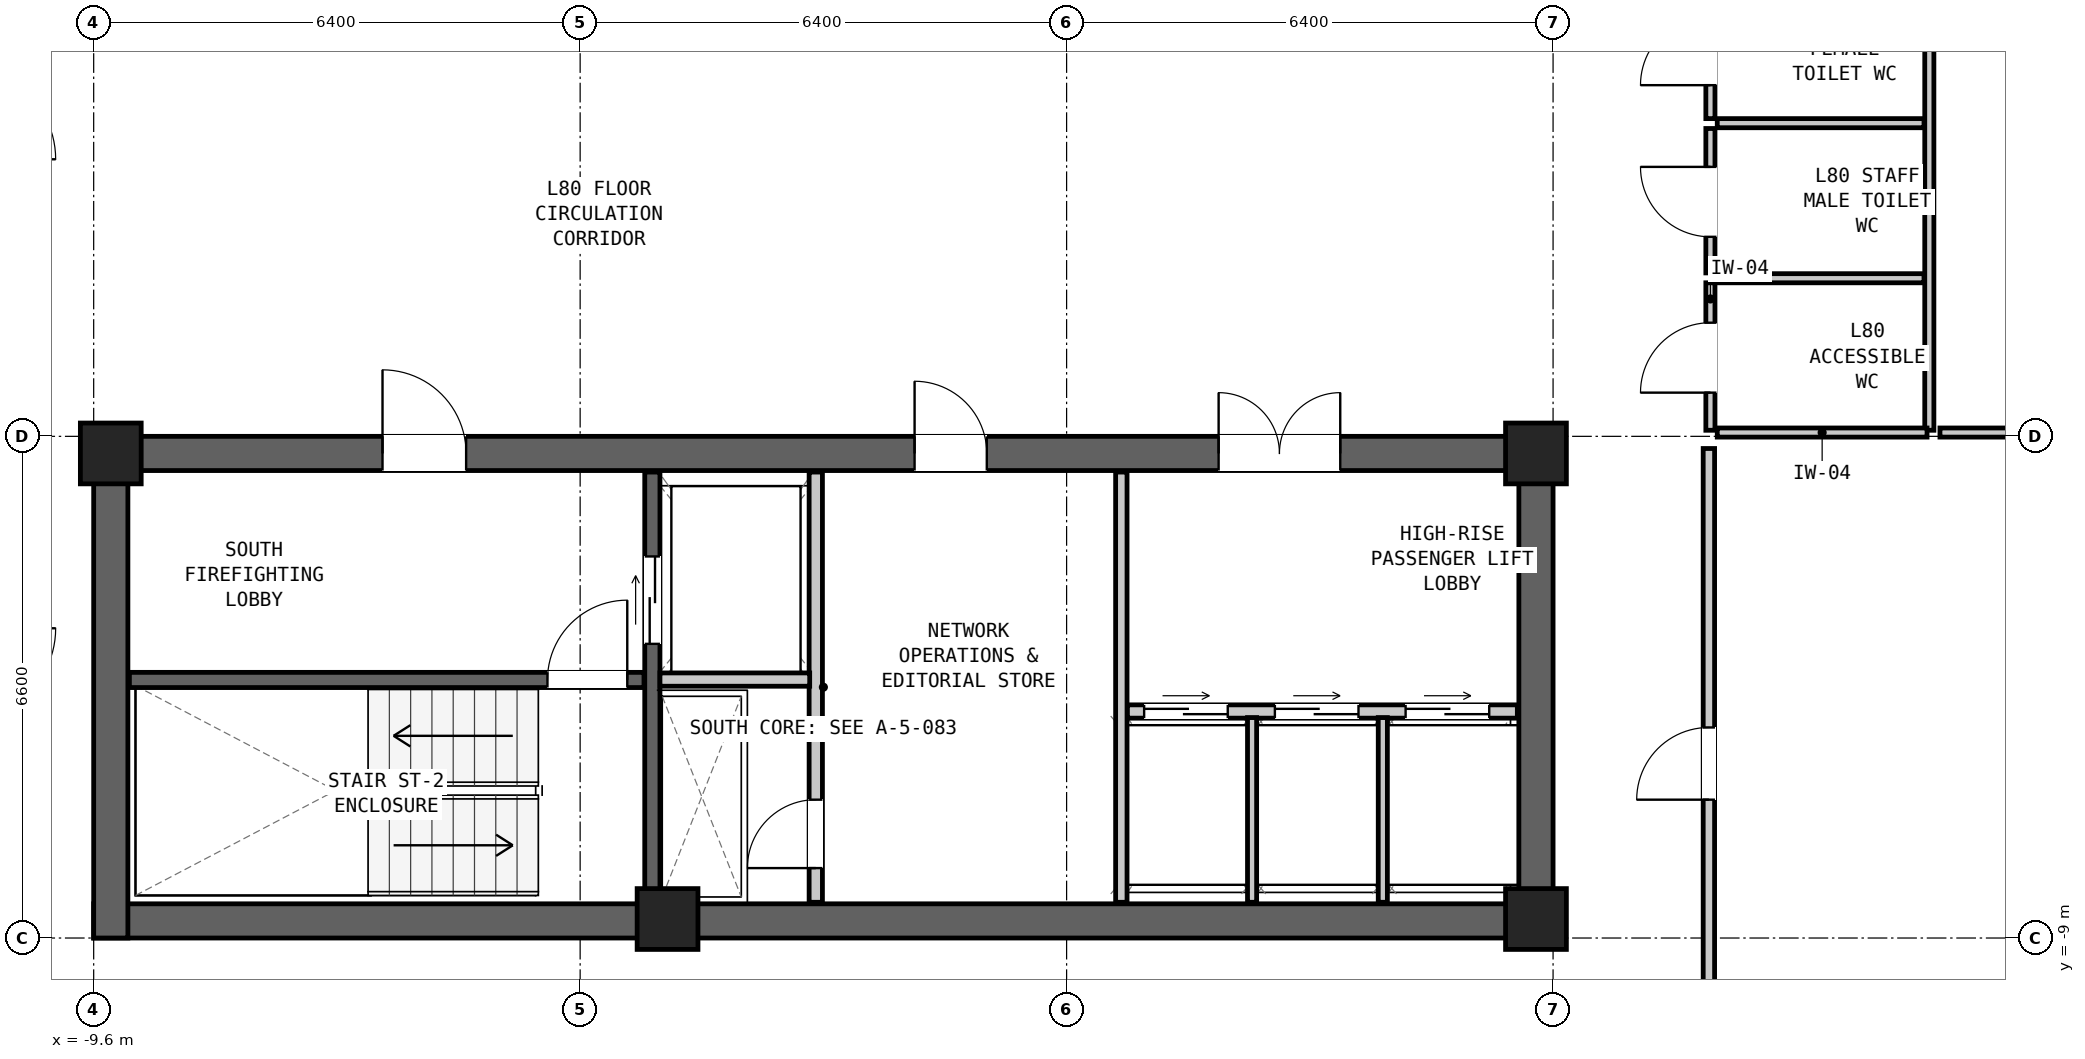
"""IFC4 building model, lengths in metres.
Left out: names, types, materials, properties, quantities, classifications, styles, units other than length and angle.
Written with IfcOpenShell. Run it as: python <this file> out.ifc"""

import sys

from ifc_helpers import new_model, si_unit, direction, frame, frame_2d, origin, origin_2d, place, context, subcontext, project, spatial, rectangle, extrude, element, fill, save


model = new_model("IFC4")
c1 = context("Model", 3, precision=1e-05, world=origin(), true_north=direction((0.0, 1.0)))
c2 = subcontext(c1, "Body", "Model", "MODEL_VIEW")
j1 = project(units=[si_unit("LENGTHUNIT", "METRE"), si_unit("PLANEANGLEUNIT", "RADIAN")], contexts=[c1])
p1 = place(None, origin())
s1 = spatial("IfcSite", under=j1, at=p1, CompositionType="ELEMENT")
p2 = place(p1, origin())
s2 = spatial("IfcBuilding", under=s1, at=p2, CompositionType="ELEMENT")
p3 = place(p2, frame((0.0, 0.0, 270.3)))
s3 = spatial("IfcBuildingStorey", under=s2, at=p3, CompositionType="ELEMENT", Elevation=270.3)
p4 = place(p3, frame((-9.6, -8.775, 0.0), z_axis=(0.0, 0.0, 1.0), x_axis=(1.0, 0.0, 0.0)))
e1 = element("IfcWall", 1, at=p4, inside=s3, PredefinedType="SHEAR", context=c2, shape_type="SweptSolid", body=[
    extrude(rectangle(XDim=19.2, YDim=0.45, at=frame_2d((9.6, 0.0))), origin(), (0.0, 0.0, 1.0), 3.05),
])
p5 = place(p3, frame((-9.6, -2.625, 0.0), z_axis=(0.0, 0.0, 1.0), x_axis=(1.0, 0.0, 0.0)))
e2 = element("IfcWall", 2, at=p5, inside=s3, PredefinedType="SHEAR", context=c2, shape_type="SweptSolid", body=[
    extrude(rectangle(XDim=19.2, YDim=0.45, at=frame_2d((9.6, 0.0))), origin(), (0.0, 0.0, 1.0), 3.05),
])
p6 = place(p5, frame((3.8, 0.0, 0.0)))
e3 = element("IfcOpeningElement", 3, at=p6, cuts=e2, PredefinedType="OPENING", context=c2, shape_type="SweptSolid", body=[
    extrude(rectangle(XDim=1.1, YDim=2.08, at=frame_2d((0.55, 1.04))), frame((0.0, 0.237, 0.0), z_axis=(0.0, -1.0, 0.0), x_axis=(1.0, 0.0, 0.0)), (0.0, 0.0, 1.0), 0.474),
])
p7 = place(p5, frame((10.8, 0.0, 0.0)))
e4 = element("IfcOpeningElement", 4, at=p7, cuts=e2, PredefinedType="OPENING", context=c2, shape_type="SweptSolid", body=[
    extrude(rectangle(XDim=0.95, YDim=2.1, at=frame_2d((0.475, 1.05))), frame((0.0, 0.237, 0.0), z_axis=(0.0, -1.0, 0.0), x_axis=(1.0, 0.0, 0.0)), (0.0, 0.0, 1.0), 0.474),
])
p8 = place(p5, frame((14.8, 0.0, 0.0)))
e5 = element("IfcOpeningElement", 5, at=p8, cuts=e2, PredefinedType="OPENING", context=c2, shape_type="SweptSolid", body=[
    extrude(rectangle(XDim=1.6, YDim=2.12, at=frame_2d((0.8, 1.06))), frame((0.0, 0.237, 0.0), z_axis=(0.0, -1.0, 0.0), x_axis=(1.0, 0.0, 0.0)), (0.0, 0.0, 1.0), 0.474),
])
for number, where, z_axis, x_axis in (
    (6, (-9.375, -9.0, 0.0), (0.0, 0.0, 1.0), (0.0, 1.0, 0.0)),
    (7, (9.375, -9.0, 0.0), (0.0, 0.0, 1.0), (0.0, 1.0, 0.0)),
):
    element("IfcWall", number, at=place(p3, frame(where, z_axis=z_axis, x_axis=x_axis)), inside=s3, PredefinedType="SHEAR", context=c2, shape_type="SweptSolid", body=[
        extrude(rectangle(XDim=6.6, YDim=0.45, at=frame_2d((3.3, 0.0))), origin(), (0.0, 0.0, 1.0), 3.05),
    ])
for number, where, z_axis, x_axis in (
    (8, (-9.375, -2.625, 0.0), (0.0, 0.0, 1.0), (1.0, 0.0, 0.0)),
    (9, (9.375, -2.625, 0.0), (0.0, 0.0, 1.0), (1.0, 0.0, 0.0)),
    (10, (-2.05, -8.75, 0.0), (0.0, 0.0, 1.0), (1.0, 0.0, 0.0)),
    (11, (9.375, -8.75, 0.0), (0.0, 0.0, 1.0), (1.0, 0.0, 0.0)),
):
    element("IfcColumn", number, at=place(p3, frame(where, z_axis=z_axis, x_axis=x_axis)), inside=s3, PredefinedType="COLUMN", context=c2, shape_type="SweptSolid", body=[
        extrude(rectangle(XDim=0.8, YDim=0.8, at=origin_2d()), origin(), (0.0, 0.0, 1.0), 3.05),
    ])
p9 = place(p3, frame((-9.13, -5.605, 0.0), z_axis=(0.0, 0.0, 1.0), x_axis=(1.0, 0.0, 0.0)))
e12 = element("IfcWall", 12, at=p9, inside=s3, PredefinedType="SHEAR", context=c2, shape_type="SweptSolid", body=[
    extrude(rectangle(XDim=6.77, YDim=0.2, at=frame_2d((3.385, 0.0))), origin(), (0.0, 0.0, 1.0), 2.86),
])
p10 = place(p9, frame((5.5, 0.0, 0.0)))
e13 = element("IfcOpeningElement", 13, at=p10, cuts=e12, PredefinedType="OPENING", context=c2, shape_type="SweptSolid", body=[
    extrude(rectangle(XDim=1.05, YDim=2.08, at=frame_2d((0.525, 1.04))), frame((0.0, 0.112, 0.0), z_axis=(0.0, -1.0, 0.0), x_axis=(1.0, 0.0, 0.0)), (0.0, 0.0, 1.0), 0.224),
])
p11 = place(p3, frame((-2.25, -8.53, 0.0), z_axis=(0.0, 0.0, 1.0), x_axis=(0.0, 1.0, 0.0)))
e14 = element("IfcWall", 14, at=p11, inside=s3, PredefinedType="SHEAR", context=c2, shape_type="SweptSolid", body=[
    extrude(rectangle(XDim=5.66, YDim=0.2, at=frame_2d((2.83, 0.0))), origin(), (0.0, 0.0, 1.0), 2.86),
])
p12 = place(p11, frame((3.4, 0.0, 0.0)))
e15 = element("IfcOpeningElement", 15, at=p12, cuts=e14, PredefinedType="OPENING", context=c2, shape_type="SweptSolid", body=[
    extrude(rectangle(XDim=1.15, YDim=2.08, at=frame_2d((0.575, 1.04))), frame((0.0, 0.112, 0.0), z_axis=(0.0, -1.0, 0.0), x_axis=(1.0, 0.0, 0.0)), (0.0, 0.0, 1.0), 0.224),
])
p13 = place(p3, frame((-0.1, -8.53, 0.0), z_axis=(0.0, 0.0, 1.0), x_axis=(0.0, 1.0, 0.0)))
e16 = element("IfcWall", 16, at=p13, inside=s3, PredefinedType="PARTITIONING", context=c2, shape_type="SweptSolid", body=[
    extrude(rectangle(XDim=5.66, YDim=0.175, at=frame_2d((2.83, 0.0))), origin(), (0.0, 0.0, 1.0), 2.86),
])
p14 = place(p13, frame((0.45, 0.0, 0.0)))
e17 = element("IfcOpeningElement", 17, at=p14, cuts=e16, PredefinedType="OPENING", context=c2, shape_type="SweptSolid", body=[
    extrude(rectangle(XDim=0.9, YDim=2.05, at=frame_2d((0.45, 1.025))), frame((0.0, 0.1, 0.0), z_axis=(0.0, -1.0, 0.0), x_axis=(1.0, 0.0, 0.0)), (0.0, 0.0, 1.0), 0.199),
])
p15 = place(p3, frame((-2.15, -5.6, 0.0), z_axis=(0.0, 0.0, 1.0), x_axis=(1.0, 0.0, 0.0)))
e18 = element("IfcWall", 18, at=p15, inside=s3, PredefinedType="PARTITIONING", context=c2, shape_type="SweptSolid", body=[
    extrude(rectangle(XDim=1.97, YDim=0.175, at=frame_2d((0.985, 0.0))), origin(), (0.0, 0.0, 1.0), 2.86),
])
p16 = place(p3, frame((3.92, -8.53, 0.0), z_axis=(0.0, 0.0, 1.0), x_axis=(0.0, 1.0, 0.0)))
e19 = element("IfcWall", 19, at=p16, inside=s3, PredefinedType="PARTITIONING", context=c2, shape_type="SweptSolid", body=[
    extrude(rectangle(XDim=5.66, YDim=0.15, at=frame_2d((2.83, 0.0))), origin(), (0.0, 0.0, 1.0), 2.86),
])
p17 = place(p3, frame((4.0, -6.02, 0.0), z_axis=(0.0, 0.0, 1.0), x_axis=(1.0, 0.0, 0.0)))
e20 = element("IfcWall", 20, at=p17, inside=s3, PredefinedType="PARTITIONING", context=c2, shape_type="SweptSolid", body=[
    extrude(rectangle(XDim=5.13, YDim=0.175, at=frame_2d((2.565, 0.0))), origin(), (0.0, 0.0, 1.0), 2.86),
])
p18 = place(p17, frame((0.22, 0.0, 0.0)))
e21 = element("IfcOpeningElement", 21, at=p18, cuts=e20, PredefinedType="OPENING", context=c2, shape_type="SweptSolid", body=[
    extrude(rectangle(XDim=1.1, YDim=2.06, at=frame_2d((0.55, 1.03))), frame((0.0, 0.1, 0.0), z_axis=(0.0, -1.0, 0.0), x_axis=(1.0, 0.0, 0.0)), (0.0, 0.0, 1.0), 0.199),
])
p19 = place(p17, frame((1.94, 0.0, 0.0)))
e22 = element("IfcOpeningElement", 22, at=p19, cuts=e20, PredefinedType="OPENING", context=c2, shape_type="SweptSolid", body=[
    extrude(rectangle(XDim=1.1, YDim=2.06, at=frame_2d((0.55, 1.03))), frame((0.0, 0.1, 0.0), z_axis=(0.0, -1.0, 0.0), x_axis=(1.0, 0.0, 0.0)), (0.0, 0.0, 1.0), 0.199),
])
p20 = place(p17, frame((3.66, 0.0, 0.0)))
e23 = element("IfcOpeningElement", 23, at=p20, cuts=e20, PredefinedType="OPENING", context=c2, shape_type="SweptSolid", body=[
    extrude(rectangle(XDim=1.1, YDim=2.06, at=frame_2d((0.55, 1.03))), frame((0.0, 0.1, 0.0), z_axis=(0.0, -1.0, 0.0), x_axis=(1.0, 0.0, 0.0)), (0.0, 0.0, 1.0), 0.199),
])
for number, where, z_axis, x_axis in (
    (24, (5.64, -8.53, 0.0), (0.0, 0.0, 1.0), (0.0, 1.0, 0.0)),
    (25, (7.36, -8.53, 0.0), (0.0, 0.0, 1.0), (0.0, 1.0, 0.0)),
):
    element("IfcWall", number, at=place(p3, frame(where, z_axis=z_axis, x_axis=x_axis)), inside=s3, PredefinedType="PARTITIONING", context=c2, shape_type="SweptSolid", body=[
        extrude(rectangle(XDim=2.43, YDim=0.12, at=frame_2d((1.215, 0.0))), origin(), (0.0, 0.0, 1.0), 2.86),
    ])
p21 = place(p3, frame((11.67, -2.32, 0.0), z_axis=(0.0, 0.0, 1.0), x_axis=(0.0, 1.0, 0.0)))
e26 = element("IfcWall", 26, at=p21, inside=s3, PredefinedType="PARTITIONING", context=c2, shape_type="SweptSolid", body=[
    extrude(rectangle(XDim=1.94, YDim=0.12, at=frame_2d((0.97, 0.0))), origin(), (0.0, 0.0, 1.0), 2.86),
])
p22 = place(p21, frame((0.495, 0.0, 0.0)))
e27 = element("IfcOpeningElement", 27, at=p22, cuts=e26, PredefinedType="OPENING", context=c2, shape_type="SweptSolid", body=[
    extrude(rectangle(XDim=0.92, YDim=2.1, at=frame_2d((0.46, 1.05))), frame((0.0, 0.072, 0.0), z_axis=(0.0, -1.0, 0.0), x_axis=(1.0, 0.0, 0.0)), (0.0, 0.0, 1.0), 0.144),
])
p23 = place(p3, frame((11.67, -0.25, 0.0), z_axis=(0.0, 0.0, 1.0), x_axis=(0.0, 1.0, 0.0)))
e28 = element("IfcWall", 28, at=p23, inside=s3, PredefinedType="PARTITIONING", context=c2, shape_type="SweptSolid", body=[
    extrude(rectangle(XDim=1.9, YDim=0.12, at=frame_2d((0.95, 0.0))), origin(), (0.0, 0.0, 1.0), 2.86),
])
p24 = place(p23, frame((0.475, 0.0, 0.0)))
e29 = element("IfcOpeningElement", 29, at=p24, cuts=e28, PredefinedType="OPENING", context=c2, shape_type="SweptSolid", body=[
    extrude(rectangle(XDim=0.92, YDim=2.1, at=frame_2d((0.46, 1.05))), frame((0.0, 0.072, 0.0), z_axis=(0.0, -1.0, 0.0), x_axis=(1.0, 0.0, 0.0)), (0.0, 0.0, 1.0), 0.144),
])
p25 = place(p3, frame((11.67, 1.78, 0.0), z_axis=(0.0, 0.0, 1.0), x_axis=(0.0, 1.0, 0.0)))
e30 = element("IfcWall", 30, at=p25, inside=s3, PredefinedType="PARTITIONING", context=c2, shape_type="SweptSolid", body=[
    extrude(rectangle(XDim=1.83, YDim=0.12, at=frame_2d((0.915, 0.0))), origin(), (0.0, 0.0, 1.0), 2.86),
])
p26 = place(p25, frame((0.44, 0.0, 0.0)))
e31 = element("IfcOpeningElement", 31, at=p26, cuts=e30, PredefinedType="OPENING", context=c2, shape_type="SweptSolid", body=[
    extrude(rectangle(XDim=0.92, YDim=2.1, at=frame_2d((0.46, 1.05))), frame((0.0, 0.072, 0.0), z_axis=(0.0, -1.0, 0.0), x_axis=(1.0, 0.0, 0.0)), (0.0, 0.0, 1.0), 0.144),
])
p27 = place(p3, frame((14.55, -2.32, 0.0), z_axis=(0.0, 0.0, 1.0), x_axis=(0.0, 1.0, 0.0)))
e32 = element("IfcWall", 32, at=p27, inside=s3, PredefinedType="PARTITIONING", context=c2, shape_type="SweptSolid", body=[
    extrude(rectangle(XDim=5.93, YDim=0.12, at=frame_2d((2.965, 0.0))), origin(), (0.0, 0.0, 1.0), 2.86),
])
p28 = place(p3, frame((11.76, -2.35, 0.0), z_axis=(0.0, 0.0, 1.0), x_axis=(1.0, 0.0, 0.0)))
e33 = element("IfcWall", 33, at=p28, inside=s3, PredefinedType="PARTITIONING", context=c2, shape_type="SweptSolid", body=[
    extrude(rectangle(XDim=2.76, YDim=0.12, at=frame_2d((1.38, 0.0))), origin(), (0.0, 0.0, 1.0), 1.24),
])
for number, where, z_axis, x_axis in (
    (34, (11.76, -0.32, 0.0), (0.0, 0.0, 1.0), (1.0, 0.0, 0.0)),
    (35, (11.76, 1.72, 0.0), (0.0, 0.0, 1.0), (1.0, 0.0, 0.0)),
):
    element("IfcWall", number, at=place(p3, frame(where, z_axis=z_axis, x_axis=x_axis)), inside=s3, PredefinedType="PARTITIONING", context=c2, shape_type="SweptSolid", body=[
        extrude(rectangle(XDim=2.72, YDim=0.12, at=frame_2d((1.36, 0.0))), origin(), (0.0, 0.0, 1.0), 2.86),
    ])
p29 = place(p3, frame((14.69, -2.35, 0.0), z_axis=(0.0, 0.0, 1.0), x_axis=(1.0, 0.0, 0.0)))
e36 = element("IfcWall", 36, at=p29, inside=s3, PredefinedType="PARTITIONING", context=c2, shape_type="SweptSolid", body=[
    extrude(rectangle(XDim=6.927, YDim=0.12, at=frame_2d((3.464, 0.0))), origin(), (0.0, 0.0, 1.0), 1.24),
])
p30 = place(p3, frame((11.65, -10.85, 0.0), z_axis=(0.0, 0.0, 1.0), x_axis=(0.0, 1.0, 0.0)))
e37 = element("IfcWall", 37, at=p30, inside=s3, PredefinedType="PARTITIONING", context=c2, shape_type="SweptSolid", body=[
    extrude(rectangle(XDim=8.29, YDim=0.15, at=frame_2d((4.145, 0.0))), origin(), (0.0, 0.0, 1.0), 2.86),
])
p31 = place(p30, frame((3.67, 0.0, 0.0)))
e38 = element("IfcOpeningElement", 38, at=p31, cuts=e37, PredefinedType="OPENING", context=c2, shape_type="SweptSolid", body=[
    extrude(rectangle(XDim=0.95, YDim=2.1, at=frame_2d((0.475, 1.05))), frame((0.0, 0.087, 0.0), z_axis=(0.0, -1.0, 0.0), x_axis=(1.0, 0.0, 0.0)), (0.0, 0.0, 1.0), 0.174),
])
p32 = place(p10, origin())
e39 = element("IfcDoor", 39, at=p32, inside=s3, OperationType="SINGLE_SWING_RIGHT", PredefinedType="DOOR", context=c2, shape_type="SweptSolid", body=[
    extrude(rectangle(XDim=1.05, YDim=2.08, at=frame_2d((0.525, 1.04))), frame((0.0, 0.025, 0.0), z_axis=(0.0, -1.0, 0.0), x_axis=(1.0, 0.0, 0.0)), (0.0, 0.0, 1.0), 0.05),
])
fill(e13, e39)
p33 = place(p6, origin())
e40 = element("IfcDoor", 40, at=p33, inside=s3, OperationType="SINGLE_SWING_LEFT", PredefinedType="DOOR", context=c2, shape_type="SweptSolid", body=[
    extrude(rectangle(XDim=1.1, YDim=2.08, at=frame_2d((0.55, 1.04))), frame((0.0, 0.025, 0.0), z_axis=(0.0, -1.0, 0.0), x_axis=(1.0, 0.0, 0.0)), (0.0, 0.0, 1.0), 0.05),
])
fill(e3, e40)
p34 = place(p12, origin())
e41 = element("IfcDoor", 41, at=p34, inside=s3, OperationType="DOUBLE_DOOR_SLIDING", PredefinedType="DOOR", context=c2, shape_type="SweptSolid", body=[
    extrude(rectangle(XDim=1.15, YDim=2.08, at=frame_2d((0.575, 1.04))), frame((0.0, 0.025, 0.0), z_axis=(0.0, -1.0, 0.0), x_axis=(1.0, 0.0, 0.0)), (0.0, 0.0, 1.0), 0.05),
])
fill(e15, e41)
p35 = place(p14, origin())
e42 = element("IfcDoor", 42, at=p35, inside=s3, OperationType="SINGLE_SWING_LEFT", PredefinedType="DOOR", context=c2, shape_type="SweptSolid", body=[
    extrude(rectangle(XDim=0.9, YDim=2.05, at=frame_2d((0.45, 1.025))), frame((0.0, 0.025, 0.0), z_axis=(0.0, -1.0, 0.0), x_axis=(1.0, 0.0, 0.0)), (0.0, 0.0, 1.0), 0.05),
])
fill(e17, e42)
p36 = place(p7, origin())
e43 = element("IfcDoor", 43, at=p36, inside=s3, OperationType="SINGLE_SWING_LEFT", PredefinedType="DOOR", context=c2, shape_type="SweptSolid", body=[
    extrude(rectangle(XDim=0.95, YDim=2.1, at=frame_2d((0.475, 1.05))), frame((0.0, 0.025, 0.0), z_axis=(0.0, -1.0, 0.0), x_axis=(1.0, 0.0, 0.0)), (0.0, 0.0, 1.0), 0.05),
])
fill(e4, e43)
p37 = place(p18, origin())
e44 = element("IfcDoor", 44, at=p37, inside=s3, OperationType="DOUBLE_DOOR_SLIDING", PredefinedType="DOOR", context=c2, shape_type="SweptSolid", body=[
    extrude(rectangle(XDim=1.1, YDim=2.06, at=frame_2d((0.55, 1.03))), frame((0.0, 0.025, 0.0), z_axis=(0.0, -1.0, 0.0), x_axis=(1.0, 0.0, 0.0)), (0.0, 0.0, 1.0), 0.05),
])
fill(e21, e44)
p38 = place(p19, origin())
e45 = element("IfcDoor", 45, at=p38, inside=s3, OperationType="DOUBLE_DOOR_SLIDING", PredefinedType="DOOR", context=c2, shape_type="SweptSolid", body=[
    extrude(rectangle(XDim=1.1, YDim=2.06, at=frame_2d((0.55, 1.03))), frame((0.0, 0.025, 0.0), z_axis=(0.0, -1.0, 0.0), x_axis=(1.0, 0.0, 0.0)), (0.0, 0.0, 1.0), 0.05),
])
fill(e22, e45)
p39 = place(p20, origin())
e46 = element("IfcDoor", 46, at=p39, inside=s3, OperationType="DOUBLE_DOOR_SLIDING", PredefinedType="DOOR", context=c2, shape_type="SweptSolid", body=[
    extrude(rectangle(XDim=1.1, YDim=2.06, at=frame_2d((0.55, 1.03))), frame((0.0, 0.025, 0.0), z_axis=(0.0, -1.0, 0.0), x_axis=(1.0, 0.0, 0.0)), (0.0, 0.0, 1.0), 0.05),
])
fill(e23, e46)
p40 = place(p8, origin())
e47 = element("IfcDoor", 47, at=p40, inside=s3, OperationType="DOUBLE_DOOR_SINGLE_SWING", PredefinedType="DOOR", context=c2, shape_type="SweptSolid", body=[
    extrude(rectangle(XDim=1.6, YDim=2.12, at=frame_2d((0.8, 1.06))), frame((0.0, 0.025, 0.0), z_axis=(0.0, -1.0, 0.0), x_axis=(1.0, 0.0, 0.0)), (0.0, 0.0, 1.0), 0.05),
])
fill(e5, e47)
p41 = place(p22, origin())
e48 = element("IfcDoor", 48, at=p41, inside=s3, OperationType="SINGLE_SWING_LEFT", PredefinedType="DOOR", context=c2, shape_type="SweptSolid", body=[
    extrude(rectangle(XDim=0.92, YDim=2.1, at=frame_2d((0.46, 1.05))), frame((0.0, 0.025, 0.0), z_axis=(0.0, -1.0, 0.0), x_axis=(1.0, 0.0, 0.0)), (0.0, 0.0, 1.0), 0.05),
])
fill(e27, e48)
p42 = place(p24, origin())
e49 = element("IfcDoor", 49, at=p42, inside=s3, OperationType="SINGLE_SWING_RIGHT", PredefinedType="DOOR", context=c2, shape_type="SweptSolid", body=[
    extrude(rectangle(XDim=0.92, YDim=2.1, at=frame_2d((0.46, 1.05))), frame((0.0, 0.025, 0.0), z_axis=(0.0, -1.0, 0.0), x_axis=(1.0, 0.0, 0.0)), (0.0, 0.0, 1.0), 0.05),
])
fill(e29, e49)
p43 = place(p26, origin())
e50 = element("IfcDoor", 50, at=p43, inside=s3, OperationType="SINGLE_SWING_LEFT", PredefinedType="DOOR", context=c2, shape_type="SweptSolid", body=[
    extrude(rectangle(XDim=0.92, YDim=2.1, at=frame_2d((0.46, 1.05))), frame((0.0, 0.025, 0.0), z_axis=(0.0, -1.0, 0.0), x_axis=(1.0, 0.0, 0.0)), (0.0, 0.0, 1.0), 0.05),
])
fill(e31, e50)
p44 = place(p31, origin())
e51 = element("IfcDoor", 51, at=p44, inside=s3, OperationType="SINGLE_SWING_LEFT", PredefinedType="DOOR", context=c2, shape_type="SweptSolid", body=[
    extrude(rectangle(XDim=0.95, YDim=2.1, at=frame_2d((0.475, 1.05))), frame((0.0, 0.025, 0.0), z_axis=(0.0, -1.0, 0.0), x_axis=(1.0, 0.0, 0.0)), (0.0, 0.0, 1.0), 0.05),
])
fill(e38, e51)
save(model, sys.argv[1])
